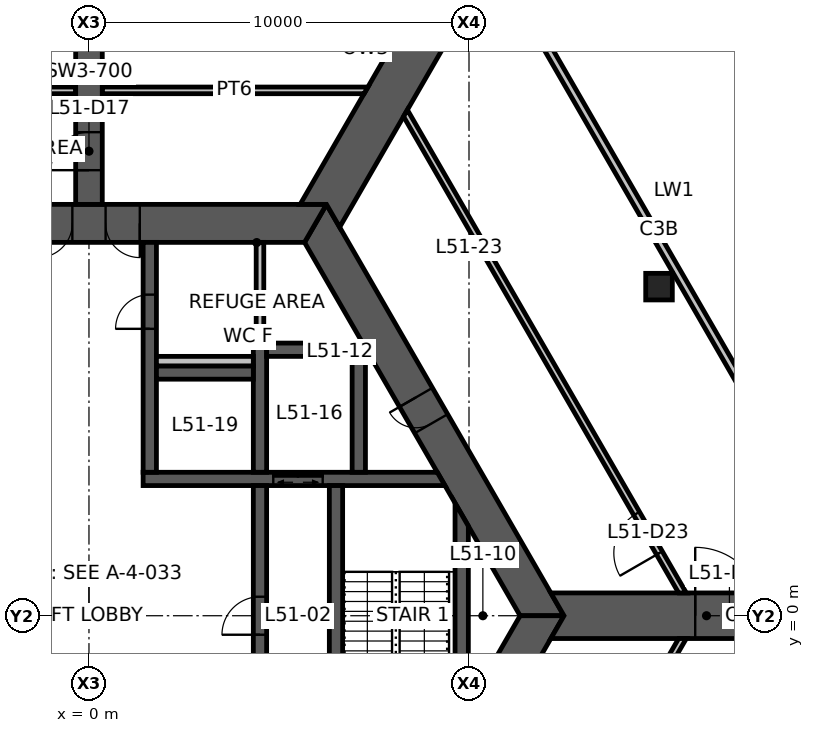
"""IFC4 building model, lengths in metres.
Left out: names, types, materials, properties, quantities, classifications, styles, units other than length and angle.
Written with IfcOpenShell. Run it as: python <this file> out.ifc"""

import sys

from ifc_helpers import new_model, si_unit, direction, frame, frame_2d, origin, origin_2d, place, context, subcontext, project, spatial, polyline, rectangle, hollow_rectangle, outline, extrude, element, fill, save


model = new_model("IFC4")
c1 = context("Model", 3, precision=1e-05, world=origin(), true_north=direction((0.0, 1.0)))
c2 = subcontext(c1, "Body", "Model", "MODEL_VIEW")
j1 = project(units=[si_unit("LENGTHUNIT", "METRE"), si_unit("PLANEANGLEUNIT", "RADIAN")], contexts=[c1])
p1 = place(None, origin())
s1 = spatial("IfcSite", under=j1, at=p1, CompositionType="ELEMENT")
p2 = place(p1, origin())
s2 = spatial("IfcBuilding", under=s1, at=p2, CompositionType="ELEMENT")
p3 = place(p2, frame((0.0, 0.0, 203.3)))
s3 = spatial("IfcBuildingStorey", under=s2, at=p3, CompositionType="ELEMENT", Elevation=203.3)
p4 = place(p3, frame((15.0, 8.66, 0.0), z_axis=(0.0, 0.0, 1.0), x_axis=(1.0, 0.0, 0.0)))
e1 = element("IfcColumn", 1, at=p4, inside=s3, PredefinedType="COLUMN", context=c2, shape_type="SweptSolid", body=[
    extrude(hollow_rectangle(XDim=0.7, YDim=0.7, WallThickness=0.036, at=origin_2d()), origin(), (0.0, 0.0, 1.0), 5.0),
])
p5 = place(p3, frame((11.922, 0.0, 0.0), z_axis=(0.0, 0.0, 1.0), x_axis=(-0.500004296715, 0.866022923061, 0.0)))
e2 = element("IfcWall", 2, at=p5, inside=s3, PredefinedType="SHEAR", context=c2, shape_type="SweptSolid", body=[
    extrude(outline(polyline([(-0.289, -0.5), (5.835, -0.5), (6.635, -0.5), (12.211, -0.5), (11.634, 0.5), (6.635, 0.5), (5.835, 0.5), (0.289, 0.5), (-0.289, -0.5)])), origin(), (0.0, 0.0, 1.0), 5.0),
])
p6 = place(p5, frame((5.835, 0.0, 0.0)))
e3 = element("IfcOpeningElement", 3, at=p6, cuts=e2, PredefinedType="OPENING", context=c2, shape_type="SweptSolid", body=[
    extrude(rectangle(XDim=0.8, YDim=2.1, at=frame_2d((0.4, 1.05))), frame((0.0, 0.51, 0.0), z_axis=(0.0, -1.0, 0.0), x_axis=(1.0, 0.0, 0.0)), (0.0, 0.0, 1.0), 1.02),
])
p7 = place(p3, frame((5.961, 10.325, 0.0), z_axis=(0.0, 0.0, 1.0), x_axis=(-1.0, 0.0, 0.0)))
e4 = element("IfcWall", 4, at=p7, inside=s3, PredefinedType="SHEAR", context=c2, shape_type="SweptSolid", body=[
    extrude(outline(polyline([(-0.289, -0.5), (4.624, -0.5), (5.523, -0.5), (6.399, -0.5), (7.299, -0.5), (12.211, -0.5), (11.634, 0.5), (7.299, 0.5), (6.399, 0.5), (5.523, 0.5), (4.624, 0.5), (0.289, 0.5), (-0.289, -0.5)])), origin(), (0.0, 0.0, 1.0), 5.0),
])
p8 = place(p7, frame((6.399, 0.0, 0.0)))
e5 = element("IfcOpeningElement", 5, at=p8, cuts=e4, PredefinedType="OPENING", context=c2, shape_type="SweptSolid", body=[
    extrude(rectangle(XDim=0.9, YDim=2.1, at=frame_2d((0.45, 1.05))), frame((0.0, 0.51, 0.0), z_axis=(0.0, -1.0, 0.0), x_axis=(1.0, 0.0, 0.0)), (0.0, 0.0, 1.0), 1.02),
])
p9 = place(p7, frame((4.624, 0.0, 0.0)))
e6 = element("IfcOpeningElement", 6, at=p9, cuts=e4, PredefinedType="OPENING", context=c2, shape_type="SweptSolid", body=[
    extrude(rectangle(XDim=0.9, YDim=2.1, at=frame_2d((0.45, 1.05))), frame((0.0, 0.51, 0.0), z_axis=(0.0, -1.0, 0.0), x_axis=(1.0, 0.0, 0.0)), (0.0, 0.0, 1.0), 1.02),
])
p10 = place(p3, frame((5.961, -10.325, 0.0), z_axis=(0.0, 0.0, 1.0), x_axis=(0.500004296715, 0.866022923061, 0.0)))
e7 = element("IfcWall", 7, at=p10, inside=s3, PredefinedType="SHEAR", context=c2, shape_type="SweptSolid", body=[
    extrude(outline(polyline([(-0.289, -0.5), (4.594, -0.5), (5.394, -0.5), (12.211, -0.5), (11.634, 0.5), (5.394, 0.5), (4.594, 0.5), (0.289, 0.5), (-0.289, -0.5)])), origin(), (0.0, 0.0, 1.0), 5.0),
])
p11 = place(p10, frame((4.594, 0.0, 0.0)))
e8 = element("IfcOpeningElement", 8, at=p11, cuts=e7, PredefinedType="OPENING", context=c2, shape_type="SweptSolid", body=[
    extrude(rectangle(XDim=0.8, YDim=2.1, at=frame_2d((0.4, 1.05))), frame((0.0, 0.51, 0.0), z_axis=(0.0, -1.0, 0.0), x_axis=(1.0, 0.0, 0.0)), (0.0, 0.0, 1.0), 1.02),
])
p12 = place(p3, frame((0.0, 10.825, 0.0), z_axis=(0.0, 0.0, 1.0), x_axis=(0.0, 1.0, 0.0)))
e9 = element("IfcWall", 9, at=p12, inside=s3, PredefinedType="SHEAR", context=c2, shape_type="SweptSolid", body=[
    extrude(rectangle(XDim=6.946, YDim=0.7, at=frame_2d((3.473, 0.0))), origin(), (0.0, 0.0, 1.0), 5.0),
])
p13 = place(p12, frame((0.9, 0.0, 0.0)))
e10 = element("IfcOpeningElement", 10, at=p13, cuts=e9, PredefinedType="OPENING", context=c2, shape_type="SweptSolid", body=[
    extrude(rectangle(XDim=1.0, YDim=2.1, at=frame_2d((0.5, 1.05))), frame((0.0, 0.36, 0.0), z_axis=(0.0, -1.0, 0.0), x_axis=(1.0, 0.0, 0.0)), (0.0, 0.0, 1.0), 0.72),
])
p14 = place(p3, frame((12.5, 0.0, -1.15), z_axis=(0.0, 0.0, 1.0), x_axis=(1.0, 0.0, 0.0)))
e11 = element("IfcWall", 11, at=p14, inside=s3, PredefinedType="SHEAR", context=c2, shape_type="SweptSolid", body=[
    extrude(outline(polyline([(-0.346, -0.6), (3.453, -0.6), (5.253, -0.6), (7.5, -0.6), (7.5, 0.6), (5.253, 0.6), (3.453, 0.6), (-0.346, 0.6), (0.0, 0.0), (-0.346, -0.6)])), origin(), (0.0, 0.0, 1.0), 6.15),
])
p15 = place(p14, frame((3.453, 0.0, 1.15)))
e12 = element("IfcOpeningElement", 12, at=p15, cuts=e11, PredefinedType="OPENING", context=c2, shape_type="SweptSolid", body=[
    extrude(rectangle(XDim=1.8, YDim=2.4, at=frame_2d((0.9, 1.2))), frame((0.0, 0.61, 0.0), z_axis=(0.0, -1.0, 0.0), x_axis=(1.0, 0.0, 0.0)), (0.0, 0.0, 1.0), 1.22),
])
p16 = place(p3, frame((6.25, 10.825, -1.15), z_axis=(0.0, 0.0, 1.0), x_axis=(0.50000045744, 0.866025139681, 0.0)))
e13 = element("IfcWall", 13, at=p16, inside=s3, PredefinedType="SHEAR", context=c2, shape_type="SweptSolid", body=[
    extrude(outline(polyline([(-0.346, -0.6), (7.5, -0.6), (7.5, 0.6), (-0.346, 0.6), (0.0, 0.0), (-0.346, -0.6)])), origin(), (0.0, 0.0, 1.0), 6.15),
])
p17 = place(p3, frame((20.389, 0.526, 0.0), z_axis=(0.0, 0.0, 1.0), x_axis=(-0.499993861681, 0.866028947716, 0.0)))
e14 = element("IfcWall", 14, at=p17, inside=s3, PredefinedType="ELEMENTEDWALL", context=c2, shape_type="SweptSolid", body=[
    extrude(rectangle(XDim=19.986, YDim=0.2, at=frame_2d((9.993, 0.0))), origin(), (0.0, 0.0, 1.0), 5.0),
])
p18 = place(p3, frame((1.425, 3.6, 0.0), z_axis=(0.0, 0.0, 1.0), x_axis=(1.0, 0.0, 0.0)))
e15 = element("IfcWall", 15, at=p18, inside=s3, PredefinedType="SHEAR", context=c2, shape_type="SweptSolid", body=[
    extrude(outline(polyline([(0.0, -0.175), (3.425, -0.175), (4.725, -0.175), (7.942, -0.175), (7.74, 0.175), (4.725, 0.175), (3.425, 0.175), (0.0, 0.175), (0.0, -0.175)])), origin(), (0.0, 0.0, 1.0), 5.0),
])
p19 = place(p18, frame((3.425, 0.0, 0.0)))
e16 = element("IfcOpeningElement", 16, at=p19, cuts=e15, PredefinedType="OPENING", context=c2, shape_type="SweptSolid", body=[
    extrude(rectangle(XDim=1.3, YDim=2.1, at=frame_2d((0.65, 1.05))), frame((0.0, 0.185, 0.0), z_axis=(0.0, -1.0, 0.0), x_axis=(1.0, 0.0, 0.0)), (0.0, 0.0, 1.0), 0.37),
])
p20 = place(p3, frame((1.6, 3.775, 0.0), z_axis=(0.0, 0.0, 1.0), x_axis=(0.0, 1.0, 0.0)))
e17 = element("IfcWall", 17, at=p20, inside=s3, PredefinedType="SHEAR", context=c2, shape_type="SweptSolid", body=[
    extrude(rectangle(XDim=6.05, YDim=0.35, at=frame_2d((3.025, 0.0))), origin(), (0.0, 0.0, 1.0), 5.0),
])
p21 = place(p20, frame((3.775, 0.0, 0.0)))
e18 = element("IfcOpeningElement", 18, at=p21, cuts=e17, PredefinedType="OPENING", context=c2, shape_type="SweptSolid", body=[
    extrude(rectangle(XDim=0.9, YDim=2.1, at=frame_2d((0.45, 1.05))), frame((0.0, 0.185, 0.0), z_axis=(0.0, -1.0, 0.0), x_axis=(1.0, 0.0, 0.0)), (0.0, 0.0, 1.0), 0.37),
])
p22 = place(p3, frame((4.5, -3.425, 0.0), z_axis=(0.0, 0.0, 1.0), x_axis=(0.0, 1.0, 0.0)))
e19 = element("IfcWall", 19, at=p22, inside=s3, PredefinedType="SHEAR", context=c2, shape_type="SweptSolid", body=[
    extrude(rectangle(XDim=6.85, YDim=0.35, at=frame_2d((3.425, 0.0))), origin(), (0.0, 0.0, 1.0), 5.0),
])
p23 = place(p22, frame((2.925, 0.0, 0.0)))
e20 = element("IfcOpeningElement", 20, at=p23, cuts=e19, PredefinedType="OPENING", context=c2, shape_type="SweptSolid", body=[
    extrude(rectangle(XDim=1.0, YDim=2.1, at=frame_2d((0.5, 1.05))), frame((0.0, 0.185, 0.0), z_axis=(0.0, -1.0, 0.0), x_axis=(1.0, 0.0, 0.0)), (0.0, 0.0, 1.0), 0.37),
])
p24 = place(p3, frame((6.5, -3.425, 0.0), z_axis=(0.0, 0.0, 1.0), x_axis=(0.0, 1.0, 0.0)))
e21 = element("IfcWall", 21, at=p24, inside=s3, PredefinedType="SHEAR", context=c2, shape_type="SweptSolid", body=[
    extrude(rectangle(XDim=6.85, YDim=0.35, at=frame_2d((3.425, 0.0))), origin(), (0.0, 0.0, 1.0), 5.0),
])
p25 = place(p24, frame((0.1, 0.0, 0.0)))
e22 = element("IfcOpeningElement", 22, at=p25, cuts=e21, PredefinedType="OPENING", context=c2, shape_type="SweptSolid", body=[
    extrude(rectangle(XDim=1.0, YDim=2.1, at=frame_2d((0.5, 1.05))), frame((0.0, 0.185, 0.0), z_axis=(0.0, -1.0, 0.0), x_axis=(1.0, 0.0, 0.0)), (0.0, 0.0, 1.0), 0.37),
])
p26 = place(p3, frame((4.5, 3.775, 0.0), z_axis=(0.0, 0.0, 1.0), x_axis=(0.0, 1.0, 0.0)))
e23 = element("IfcWall", 23, at=p26, inside=s3, PredefinedType="SHEAR", context=c2, shape_type="SweptSolid", body=[
    extrude(rectangle(XDim=3.4, YDim=0.35, at=frame_2d((1.7, 0.0))), origin(), (0.0, 0.0, 1.0), 5.0),
])
p27 = place(p3, frame((1.775, 6.4, 0.0), z_axis=(0.0, 0.0, 1.0), x_axis=(1.0, 0.0, 0.0)))
e24 = element("IfcWall", 24, at=p27, inside=s3, PredefinedType="SHEAR", context=c2, shape_type="SweptSolid", body=[
    extrude(rectangle(XDim=2.55, YDim=0.35, at=frame_2d((1.275, 0.0))), origin(), (0.0, 0.0, 1.0), 5.0),
])
p28 = place(p3, frame((4.675, 7.0, 0.0), z_axis=(0.0, 0.0, 1.0), x_axis=(1.0, 0.0, 0.0)))
e25 = element("IfcWall", 25, at=p28, inside=s3, PredefinedType="SHEAR", context=c2, shape_type="SweptSolid", body=[
    extrude(rectangle(XDim=2.25, YDim=0.35, at=frame_2d((1.125, 0.0))), origin(), (0.0, 0.0, 1.0), 5.0),
])
p29 = place(p3, frame((7.1, 3.775, 0.0), z_axis=(0.0, 0.0, 1.0), x_axis=(0.0, 1.0, 0.0)))
e26 = element("IfcWall", 26, at=p29, inside=s3, PredefinedType="SHEAR", context=c2, shape_type="SweptSolid", body=[
    extrude(outline(polyline([(0.0, -0.175), (3.274, -0.175), (3.4, 0.0), (3.4, 0.175), (0.0, 0.175), (0.0, -0.175)])), origin(), (0.0, 0.0, 1.0), 5.0),
])
p30 = place(p3, frame((9.808, -2.662, 0.0), z_axis=(0.0, 0.0, 1.0), x_axis=(0.0, 1.0, 0.0)))
e27 = element("IfcWall", 27, at=p30, inside=s3, PredefinedType="SHEAR", context=c2, shape_type="SweptSolid", body=[
    extrude(outline(polyline([(0.303, -0.175), (5.021, -0.175), (5.628, 0.175), (-0.303, 0.175), (0.303, -0.175)])), origin(), (0.0, 0.0, 1.0), 5.0),
])
p31 = place(p3, frame((4.5, 7.175, 0.0), z_axis=(0.0, 0.0, 1.0), x_axis=(0.0, 1.0, 0.0)))
e28 = element("IfcWall", 28, at=p31, inside=s3, PredefinedType="STANDARD", context=c2, shape_type="SweptSolid", body=[
    extrude(rectangle(XDim=2.65, YDim=0.2, at=frame_2d((1.325, 0.0))), origin(), (0.0, 0.0, 1.0), 5.0),
])
p32 = place(p3, frame((1.775, 6.7, 0.0), z_axis=(0.0, 0.0, 1.0), x_axis=(1.0, 0.0, 0.0)))
e29 = element("IfcWall", 29, at=p32, inside=s3, PredefinedType="PLUMBINGWALL", context=c2, shape_type="SweptSolid", body=[
    extrude(rectangle(XDim=2.55, YDim=0.25, at=frame_2d((1.275, 0.0))), origin(), (0.0, 0.0, 1.0), 5.0),
])
p33 = place(p3, frame((15.617, 0.6, 0.0), z_axis=(0.0, 0.0, 1.0), x_axis=(-0.499988229334, 0.866032199475, 0.0)))
e30 = element("IfcWall", 30, at=p33, inside=s3, PredefinedType="PARTITIONING", context=c2, shape_type="SweptSolid", body=[
    extrude(outline(polyline([(-0.051, -0.087), (1.213, -0.087), (2.413, -0.087), (14.628, -0.087), (14.527, 0.087), (2.413, 0.087), (1.213, 0.087), (0.051, 0.087), (-0.051, -0.087)])), origin(), (0.0, 0.0, 1.0), 4.8),
])
p34 = place(p33, frame((1.213, 0.0, 0.0)))
e31 = element("IfcOpeningElement", 31, at=p34, cuts=e30, PredefinedType="OPENING", context=c2, shape_type="SweptSolid", body=[
    extrude(rectangle(XDim=1.2, YDim=2.1, at=frame_2d((0.6, 1.05))), frame((0.0, 0.098, 0.0), z_axis=(0.0, -1.0, 0.0), x_axis=(1.0, 0.0, 0.0)), (0.0, 0.0, 1.0), 0.195),
])
p35 = place(p3, frame((7.289, 13.825, 0.0), z_axis=(0.0, 0.0, 1.0), x_axis=(-1.0, 0.0, 0.0)))
e32 = element("IfcWall", 32, at=p35, inside=s3, PredefinedType="PARTITIONING", context=c2, shape_type="SweptSolid", body=[
    extrude(outline(polyline([(-0.051, -0.087), (6.934, -0.087), (6.934, 0.087), (0.051, 0.087), (-0.051, -0.087)])), origin(), (0.0, 0.0, 1.0), 4.8),
])
p36 = place(p3, frame((-0.355, 13.825, 0.0), z_axis=(0.0, 0.0, 1.0), x_axis=(-1.0, 0.0, 0.0)))
e33 = element("IfcWall", 33, at=p36, inside=s3, PredefinedType="PARTITIONING", context=c2, shape_type="SweptSolid", body=[
    extrude(outline(polyline([(0.0, -0.087), (1.9, -0.087), (3.1, -0.087), (6.985, -0.087), (6.884, 0.087), (3.1, 0.087), (1.9, 0.087), (0.0, 0.087), (0.0, -0.087)])), origin(), (0.0, 0.0, 1.0), 4.8),
])
p37 = place(p36, frame((1.9, 0.0, 0.0)))
e34 = element("IfcOpeningElement", 34, at=p37, cuts=e33, PredefinedType="OPENING", context=c2, shape_type="SweptSolid", body=[
    extrude(rectangle(XDim=1.2, YDim=2.1, at=frame_2d((0.6, 1.05))), frame((0.0, 0.098, 0.0), z_axis=(0.0, -1.0, 0.0), x_axis=(1.0, 0.0, 0.0)), (0.0, 0.0, 1.0), 0.195),
])
p38 = place(p3, frame((12.15, -6.605, 0.0), z_axis=(0.0, 0.0, 1.0), x_axis=(0.499986605379, 0.866033137035, 0.0)))
e35 = element("IfcWall", 35, at=p38, inside=s3, PredefinedType="PARTITIONING", context=c2, shape_type="SweptSolid", body=[
    extrude(outline(polyline([(0.0, -0.087), (1.9, -0.087), (3.1, -0.087), (6.984, -0.087), (6.883, 0.087), (3.1, 0.087), (1.9, 0.087), (0.0, 0.087), (0.0, -0.087)])), origin(), (0.0, 0.0, 1.0), 4.8),
])
p39 = place(p38, frame((1.9, 0.0, 0.0)))
e36 = element("IfcOpeningElement", 36, at=p39, cuts=e35, PredefinedType="OPENING", context=c2, shape_type="SweptSolid", body=[
    extrude(rectangle(XDim=1.2, YDim=2.1, at=frame_2d((0.6, 1.05))), frame((0.0, 0.098, 0.0), z_axis=(0.0, -1.0, 0.0), x_axis=(1.0, 0.0, 0.0)), (0.0, 0.0, 1.0), 0.195),
])
p40 = place(p8, origin())
e37 = element("IfcDoor", 37, at=p40, inside=s3, OperationType="SINGLE_SWING_RIGHT", PredefinedType="DOOR", context=c2, shape_type="SweptSolid", body=[
    extrude(rectangle(XDim=0.9, YDim=2.1, at=frame_2d((0.45, 1.05))), frame((0.0, 0.025, 0.0), z_axis=(0.0, -1.0, 0.0), x_axis=(1.0, 0.0, 0.0)), (0.0, 0.0, 1.0), 0.05),
])
fill(e5, e37)
p41 = place(p9, origin())
e38 = element("IfcDoor", 38, at=p41, inside=s3, OperationType="SINGLE_SWING_LEFT", PredefinedType="DOOR", context=c2, shape_type="SweptSolid", body=[
    extrude(rectangle(XDim=0.9, YDim=2.1, at=frame_2d((0.45, 1.05))), frame((0.0, 0.025, 0.0), z_axis=(0.0, -1.0, 0.0), x_axis=(1.0, 0.0, 0.0)), (0.0, 0.0, 1.0), 0.05),
])
fill(e6, e38)
p42 = place(p6, origin())
e39 = element("IfcDoor", 39, at=p42, inside=s3, OperationType="SINGLE_SWING_RIGHT", PredefinedType="DOOR", context=c2, shape_type="SweptSolid", body=[
    extrude(rectangle(XDim=0.8, YDim=2.1, at=frame_2d((0.4, 1.05))), frame((0.0, 0.025, 0.0), z_axis=(0.0, -1.0, 0.0), x_axis=(1.0, 0.0, 0.0)), (0.0, 0.0, 1.0), 0.05),
])
fill(e3, e39)
p43 = place(p23, origin())
e40 = element("IfcDoor", 40, at=p43, inside=s3, OperationType="SINGLE_SWING_LEFT", PredefinedType="DOOR", context=c2, shape_type="SweptSolid", body=[
    extrude(rectangle(XDim=1.0, YDim=2.1, at=frame_2d((0.5, 1.05))), frame((0.0, 0.025, 0.0), z_axis=(0.0, -1.0, 0.0), x_axis=(1.0, 0.0, 0.0)), (0.0, 0.0, 1.0), 0.05),
])
fill(e20, e40)
p44 = place(p21, origin())
e41 = element("IfcDoor", 41, at=p44, inside=s3, OperationType="SINGLE_SWING_LEFT", PredefinedType="DOOR", context=c2, shape_type="SweptSolid", body=[
    extrude(rectangle(XDim=0.9, YDim=2.1, at=frame_2d((0.45, 1.05))), frame((0.0, 0.025, 0.0), z_axis=(0.0, -1.0, 0.0), x_axis=(1.0, 0.0, 0.0)), (0.0, 0.0, 1.0), 0.05),
])
fill(e18, e41)
p45 = place(p13, origin())
e42 = element("IfcDoor", 42, at=p45, inside=s3, OperationType="SINGLE_SWING_LEFT", PredefinedType="DOOR", context=c2, shape_type="SweptSolid", body=[
    extrude(rectangle(XDim=1.0, YDim=2.1, at=frame_2d((0.5, 1.05))), frame((0.0, 0.025, 0.0), z_axis=(0.0, -1.0, 0.0), x_axis=(1.0, 0.0, 0.0)), (0.0, 0.0, 1.0), 0.05),
])
fill(e10, e42)
p46 = place(p15, origin())
e43 = element("IfcDoor", 43, at=p46, inside=s3, OperationType="DOUBLE_DOOR_SINGLE_SWING", PredefinedType="DOOR", context=c2, shape_type="SweptSolid", body=[
    extrude(rectangle(XDim=1.8, YDim=2.4, at=frame_2d((0.9, 1.2))), frame((0.0, 0.025, 0.0), z_axis=(0.0, -1.0, 0.0), x_axis=(1.0, 0.0, 0.0)), (0.0, 0.0, 1.0), 0.05),
])
fill(e12, e43)
p47 = place(p34, origin())
e44 = element("IfcDoor", 44, at=p47, inside=s3, OperationType="DOUBLE_DOOR_SINGLE_SWING", PredefinedType="DOOR", context=c2, shape_type="SweptSolid", body=[
    extrude(rectangle(XDim=1.2, YDim=2.1, at=frame_2d((0.6, 1.05))), frame((0.0, 0.025, 0.0), z_axis=(0.0, -1.0, 0.0), x_axis=(1.0, 0.0, 0.0)), (0.0, 0.0, 1.0), 0.05),
])
fill(e31, e44)
p48 = place(p19, origin())
e45 = element("IfcDoor", 45, at=p48, inside=s3, OperationType="DOUBLE_DOOR_SLIDING", PredefinedType="DOOR", context=c2, shape_type="SweptSolid", body=[
    extrude(rectangle(XDim=1.3, YDim=2.1, at=frame_2d((0.65, 1.05))), frame((0.0, 0.025, 0.0), z_axis=(0.0, -1.0, 0.0), x_axis=(1.0, 0.0, 0.0)), (0.0, 0.0, 1.0), 0.05),
])
fill(e16, e45)
save(model, sys.argv[1])
